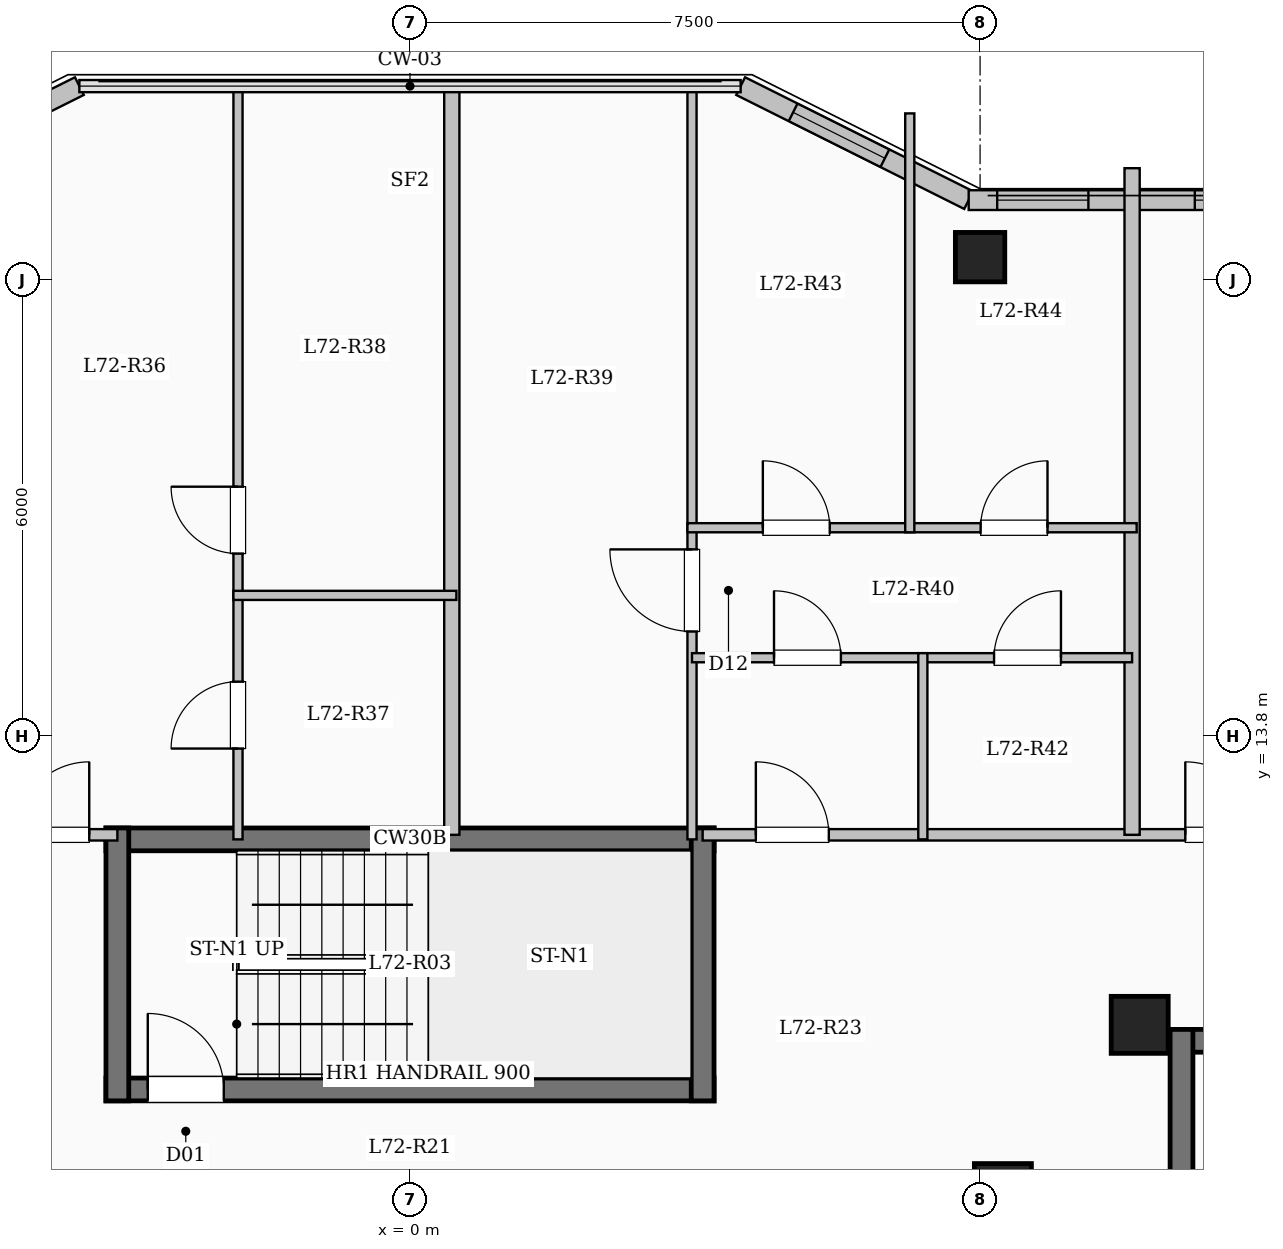
"""IFC4 building model, lengths in metres.
Left out: names, types, materials, properties, quantities, classifications, styles, units other than length and angle.
Written with IfcOpenShell. Run it as: python <this file> out.ifc"""

import sys

from ifc_helpers import new_model, si_unit, direction, frame, frame_2d, origin, origin_2d, place, context, subcontext, project, spatial, rectangle, extrude, element, fill, save


model = new_model("IFC4")
c1 = context("Model", 3, precision=1e-05, world=origin(), true_north=direction((0.0, 1.0)))
c2 = subcontext(c1, "Body", "Model", "MODEL_VIEW")
j1 = project(units=[si_unit("LENGTHUNIT", "METRE"), si_unit("PLANEANGLEUNIT", "RADIAN")], contexts=[c1])
p1 = place(None, origin())
s1 = spatial("IfcSite", under=j1, at=p1, CompositionType="ELEMENT")
p2 = place(p1, origin())
s2 = spatial("IfcBuilding", under=s1, at=p2, CompositionType="ELEMENT")
p3 = place(p2, frame((0.0, 0.0, 264.95)))
s3 = spatial("IfcBuildingStorey", under=s2, at=p3, CompositionType="ELEMENT", Elevation=264.95)
for number, where, z_axis, x_axis in (
    (1, (7.8, 7.8, 0.0), (0.0, 0.0, 1.0), (1.0, 0.0, 0.0)),
    (2, (9.6, 10.0, 0.0), (0.0, 0.0, 1.0), (1.0, 0.0, 0.0)),
):
    element("IfcColumn", number, at=place(p3, frame(where, z_axis=z_axis, x_axis=x_axis)), inside=s3, PredefinedType="COLUMN", context=c2, shape_type="SweptSolid", body=[
        extrude(rectangle(XDim=0.75, YDim=0.75, at=origin_2d()), origin(), (0.0, 0.0, 1.0), 3.35),
    ])
p4 = place(p3, frame((7.5, 20.1, 0.0), z_axis=(0.0, 0.0, 1.0), x_axis=(1.0, 0.0, 0.0)))
e3 = element("IfcColumn", 3, at=p4, inside=s3, PredefinedType="COLUMN", context=c2, shape_type="SweptSolid", body=[
    extrude(rectangle(XDim=0.65, YDim=0.65, at=origin_2d()), origin(), (0.0, 0.0, 1.0), 3.35),
])
p5 = place(p3, frame((-7.35, 20.85, 0.0), z_axis=(0.0, 0.0, 1.0), x_axis=(0.894427191, 0.4472135955, 0.0)))
e4 = element("IfcWall", 4, at=p5, inside=s3, PredefinedType="SOLIDWALL", context=c2, shape_type="SweptSolid", body=[
    extrude(rectangle(XDim=3.354, YDim=0.26, at=frame_2d((1.677, 0.0))), origin(), (0.0, 0.0, 1.0), 3.1),
])
p6 = place(p5, frame((0.401, 0.0, 0.95)))
e5 = element("IfcOpeningElement", 5, at=p6, cuts=e4, PredefinedType="OPENING", context=c2, shape_type="SweptSolid", body=[
    extrude(rectangle(XDim=1.0, YDim=1.5, at=frame_2d((0.5, 0.75))), frame((0.0, 0.14, 0.0), z_axis=(0.0, -1.0, 0.0), x_axis=(1.0, 0.0, 0.0)), (0.0, 0.0, 1.0), 0.28),
])
p7 = place(p3, frame((4.35, 22.35, 0.0), z_axis=(0.0, 0.0, 1.0), x_axis=(0.894427191, -0.4472135955, 0.0)))
e6 = element("IfcWall", 6, at=p7, inside=s3, PredefinedType="SOLIDWALL", context=c2, shape_type="SweptSolid", body=[
    extrude(rectangle(XDim=3.354, YDim=0.26, at=frame_2d((1.677, 0.0))), origin(), (0.0, 0.0, 1.0), 3.1),
])
p8 = place(p7, frame((0.772, 0.0, 0.95)))
e7 = element("IfcOpeningElement", 7, at=p8, cuts=e6, PredefinedType="OPENING", context=c2, shape_type="SweptSolid", body=[
    extrude(rectangle(XDim=1.35, YDim=1.55, at=frame_2d((0.675, 0.775))), frame((0.0, 0.14, 0.0), z_axis=(0.0, -1.0, 0.0), x_axis=(1.0, 0.0, 0.0)), (0.0, 0.0, 1.0), 0.28),
])
p9 = place(p3, frame((7.35, 20.85, 0.0), z_axis=(0.0, 0.0, 1.0), x_axis=(1.0, 0.0, 0.0)))
e8 = element("IfcWall", 8, at=p9, inside=s3, PredefinedType="SOLIDWALL", context=c2, shape_type="SweptSolid", body=[
    extrude(rectangle(XDim=10.5, YDim=0.26, at=frame_2d((5.25, 0.0))), origin(), (0.0, 0.0, 1.0), 3.1),
])
p10 = place(p9, frame((0.375, 0.0, 0.95)))
e9 = element("IfcOpeningElement", 9, at=p10, cuts=e8, PredefinedType="OPENING", context=c2, shape_type="SweptSolid", body=[
    extrude(rectangle(XDim=1.2, YDim=1.5, at=frame_2d((0.6, 0.75))), frame((0.0, 0.14, 0.0), z_axis=(0.0, -1.0, 0.0), x_axis=(1.0, 0.0, 0.0)), (0.0, 0.0, 1.0), 0.28),
])
p11 = place(p9, frame((2.975, 0.0, 0.9)))
e10 = element("IfcOpeningElement", 10, at=p11, cuts=e8, PredefinedType="OPENING", context=c2, shape_type="SweptSolid", body=[
    extrude(rectangle(XDim=1.65, YDim=1.6, at=frame_2d((0.825, 0.8))), frame((0.0, 0.14, 0.0), z_axis=(0.0, -1.0, 0.0), x_axis=(1.0, 0.0, 0.0)), (0.0, 0.0, 1.0), 0.28),
])
p12 = place(p9, frame((6.1, 0.0, 0.95)))
e11 = element("IfcOpeningElement", 11, at=p12, cuts=e8, PredefinedType="OPENING", context=c2, shape_type="SweptSolid", body=[
    extrude(rectangle(XDim=1.2, YDim=1.5, at=frame_2d((0.6, 0.75))), frame((0.0, 0.14, 0.0), z_axis=(0.0, -1.0, 0.0), x_axis=(1.0, 0.0, 0.0)), (0.0, 0.0, 1.0), 0.28),
])
p13 = place(p9, frame((8.575, 0.0, 0.95)))
e12 = element("IfcOpeningElement", 12, at=p13, cuts=e8, PredefinedType="OPENING", context=c2, shape_type="SweptSolid", body=[
    extrude(rectangle(XDim=1.2, YDim=1.5, at=frame_2d((0.6, 0.75))), frame((0.0, 0.14, 0.0), z_axis=(0.0, -1.0, 0.0), x_axis=(1.0, 0.0, 0.0)), (0.0, 0.0, 1.0), 0.28),
])
p14 = place(p3, frame((10.0, 9.79, 0.0), z_axis=(0.0, 0.0, 1.0), x_axis=(1.0, 0.0, 0.0)))
e13 = element("IfcWall", 13, at=p14, inside=s3, PredefinedType="SHEAR", context=c2, shape_type="SweptSolid", body=[
    extrude(rectangle(XDim=8.0, YDim=0.3, at=frame_2d((4.0, 0.0))), origin(), (0.0, 0.0, 1.0), 3.35),
])
p15 = place(p3, frame((10.15, 6.35, 0.0), z_axis=(0.0, 0.0, 1.0), x_axis=(0.0, 1.0, 0.0)))
e14 = element("IfcWall", 14, at=p15, inside=s3, PredefinedType="SHEAR", context=c2, shape_type="SweptSolid", body=[
    extrude(rectangle(XDim=3.59, YDim=0.3, at=frame_2d((1.795, 0.0))), origin(), (0.0, 0.0, 1.0), 3.35),
])
p16 = place(p3, frame((-4.0, 12.44, 0.0), z_axis=(0.0, 0.0, 1.0), x_axis=(1.0, 0.0, 0.0)))
e15 = element("IfcWall", 15, at=p16, inside=s3, PredefinedType="SHEAR", context=c2, shape_type="SweptSolid", body=[
    extrude(rectangle(XDim=8.0, YDim=0.3, at=frame_2d((4.0, 0.0))), origin(), (0.0, 0.0, 1.0), 3.35),
])
p17 = place(p3, frame((-4.0, 9.15, 0.0), z_axis=(0.0, 0.0, 1.0), x_axis=(1.0, 0.0, 0.0)))
e16 = element("IfcWall", 16, at=p17, inside=s3, PredefinedType="SHEAR", context=c2, shape_type="SweptSolid", body=[
    extrude(rectangle(XDim=8.0, YDim=0.3, at=frame_2d((4.0, 0.0))), origin(), (0.0, 0.0, 1.0), 3.35),
])
p18 = place(p17, frame((0.55, 0.0, 0.0)))
e17 = element("IfcOpeningElement", 17, at=p18, cuts=e16, PredefinedType="OPENING", context=c2, shape_type="SweptSolid", body=[
    extrude(rectangle(XDim=1.0, YDim=2.15, at=frame_2d((0.5, 1.075))), frame((0.0, 0.16, 0.0), z_axis=(0.0, -1.0, 0.0), x_axis=(1.0, 0.0, 0.0)), (0.0, 0.0, 1.0), 0.32),
])
for number, where, z_axis, x_axis in (
    (18, (-3.85, 9.0, 0.0), (0.0, 0.0, 1.0), (0.0, 1.0, 0.0)),
    (19, (3.85, 9.0, 0.0), (0.0, 0.0, 1.0), (0.0, 1.0, 0.0)),
):
    element("IfcWall", number, at=place(p3, frame(where, z_axis=z_axis, x_axis=x_axis)), inside=s3, PredefinedType="SHEAR", context=c2, shape_type="SweptSolid", body=[
        extrude(rectangle(XDim=3.59, YDim=0.3, at=frame_2d((1.795, 0.0))), origin(), (0.0, 0.0, 1.0), 3.35),
    ])
p19 = place(p3, frame((-17.75, 12.5, 0.0), z_axis=(0.0, 0.0, 1.0), x_axis=(1.0, 0.0, 0.0)))
e20 = element("IfcWall", 20, at=p19, inside=s3, PredefinedType="PARTITIONING", context=c2, shape_type="SweptSolid", body=[
    extrude(rectangle(XDim=13.9, YDim=0.15, at=frame_2d((6.95, 0.0))), origin(), (0.0, 0.0, 1.0), 3.1),
])
p20 = place(p19, frame((0.7, 0.0, 0.0)))
e21 = element("IfcOpeningElement", 21, at=p20, cuts=e20, PredefinedType="OPENING", context=c2, shape_type="SweptSolid", body=[
    extrude(rectangle(XDim=0.96, YDim=2.15, at=frame_2d((0.48, 1.075))), frame((0.0, 0.085, 0.0), z_axis=(0.0, -1.0, 0.0), x_axis=(1.0, 0.0, 0.0)), (0.0, 0.0, 1.0), 0.17),
])
p21 = place(p19, frame((7.105, 0.0, 0.0)))
e22 = element("IfcOpeningElement", 22, at=p21, cuts=e20, PredefinedType="OPENING", context=c2, shape_type="SweptSolid", body=[
    extrude(rectangle(XDim=0.96, YDim=2.15, at=frame_2d((0.48, 1.075))), frame((0.0, 0.085, 0.0), z_axis=(0.0, -1.0, 0.0), x_axis=(1.0, 0.0, 0.0)), (0.0, 0.0, 1.0), 0.17),
])
p22 = place(p19, frame((12.57, 0.0, 0.0)))
e23 = element("IfcOpeningElement", 23, at=p22, cuts=e20, PredefinedType="OPENING", context=c2, shape_type="SweptSolid", body=[
    extrude(rectangle(XDim=0.96, YDim=2.15, at=frame_2d((0.48, 1.075))), frame((0.0, 0.085, 0.0), z_axis=(0.0, -1.0, 0.0), x_axis=(1.0, 0.0, 0.0)), (0.0, 0.0, 1.0), 0.17),
])
p23 = place(p3, frame((3.85, 12.5, 0.0), z_axis=(0.0, 0.0, 1.0), x_axis=(1.0, 0.0, 0.0)))
e24 = element("IfcWall", 24, at=p23, inside=s3, PredefinedType="PARTITIONING", context=c2, shape_type="SweptSolid", body=[
    extrude(rectangle(XDim=13.9, YDim=0.15, at=frame_2d((6.95, 0.0))), origin(), (0.0, 0.0, 1.0), 3.1),
])
p24 = place(p23, frame((0.7, 0.0, 0.0)))
e25 = element("IfcOpeningElement", 25, at=p24, cuts=e24, PredefinedType="OPENING", context=c2, shape_type="SweptSolid", body=[
    extrude(rectangle(XDim=0.96, YDim=2.15, at=frame_2d((0.48, 1.075))), frame((0.0, 0.085, 0.0), z_axis=(0.0, -1.0, 0.0), x_axis=(1.0, 0.0, 0.0)), (0.0, 0.0, 1.0), 0.17),
])
p25 = place(p23, frame((6.35, 0.0, 0.0)))
e26 = element("IfcOpeningElement", 26, at=p25, cuts=e24, PredefinedType="OPENING", context=c2, shape_type="SweptSolid", body=[
    extrude(rectangle(XDim=0.96, YDim=2.15, at=frame_2d((0.48, 1.075))), frame((0.0, 0.085, 0.0), z_axis=(0.0, -1.0, 0.0), x_axis=(1.0, 0.0, 0.0)), (0.0, 0.0, 1.0), 0.17),
])
p26 = place(p3, frame((0.55, 12.5, 0.0), z_axis=(0.0, 0.0, 1.0), x_axis=(0.0, 1.0, 0.0)))
e27 = element("IfcWall", 27, at=p26, inside=s3, PredefinedType="SOLIDWALL", context=c2, shape_type="SweptSolid", body=[
    extrude(rectangle(XDim=9.88, YDim=0.2, at=frame_2d((4.94, 0.0))), origin(), (0.0, 0.0, 1.0), 3.1),
])
p27 = place(p3, frame((-2.263, 12.44, 0.0), z_axis=(0.0, 0.0, 1.0), x_axis=(0.0, 1.0, 0.0)))
e28 = element("IfcWall", 28, at=p27, inside=s3, PredefinedType="PARTITIONING", context=c2, shape_type="SweptSolid", body=[
    extrude(rectangle(XDim=3.21, YDim=0.12, at=frame_2d((1.605, 0.0))), origin(), (0.0, 0.0, 1.0), 3.1),
])
p28 = place(p27, frame((1.195, 0.0, 0.0)))
e29 = element("IfcOpeningElement", 29, at=p28, cuts=e28, PredefinedType="OPENING", context=c2, shape_type="SweptSolid", body=[
    extrude(rectangle(XDim=0.88, YDim=2.1, at=frame_2d((0.44, 1.05))), frame((0.0, 0.07, 0.0), z_axis=(0.0, -1.0, 0.0), x_axis=(1.0, 0.0, 0.0)), (0.0, 0.0, 1.0), 0.14),
])
p29 = place(p3, frame((-2.263, 15.65, 0.0), z_axis=(0.0, 0.0, 1.0), x_axis=(0.0, 1.0, 0.0)))
e30 = element("IfcWall", 30, at=p29, inside=s3, PredefinedType="PARTITIONING", context=c2, shape_type="SweptSolid", body=[
    extrude(rectangle(XDim=6.73, YDim=0.12, at=frame_2d((3.365, 0.0))), origin(), (0.0, 0.0, 1.0), 3.1),
])
p30 = place(p29, frame((0.55, 0.0, 0.0)))
e31 = element("IfcOpeningElement", 31, at=p30, cuts=e30, PredefinedType="OPENING", context=c2, shape_type="SweptSolid", body=[
    extrude(rectangle(XDim=0.88, YDim=2.1, at=frame_2d((0.44, 1.05))), frame((0.0, 0.07, 0.0), z_axis=(0.0, -1.0, 0.0), x_axis=(1.0, 0.0, 0.0)), (0.0, 0.0, 1.0), 0.14),
])
p31 = place(p3, frame((-2.323, 15.65, 0.0), z_axis=(0.0, 0.0, 1.0), x_axis=(1.0, 0.0, 0.0)))
e32 = element("IfcWall", 32, at=p31, inside=s3, PredefinedType="PARTITIONING", context=c2, shape_type="SweptSolid", body=[
    extrude(rectangle(XDim=2.933, YDim=0.12, at=frame_2d((1.467, 0.0))), origin(), (0.0, 0.0, 1.0), 2.785),
])
p32 = place(p3, frame((9.5, 12.5, 0.0), z_axis=(0.0, 0.0, 1.0), x_axis=(0.0, 1.0, 0.0)))
e33 = element("IfcWall", 33, at=p32, inside=s3, PredefinedType="SOLIDWALL", context=c2, shape_type="SweptSolid", body=[
    extrude(rectangle(XDim=8.77, YDim=0.2, at=frame_2d((4.385, 0.0))), origin(), (0.0, 0.0, 1.0), 3.1),
])
p33 = place(p3, frame((3.71, 12.44, 0.0), z_axis=(0.0, 0.0, 1.0), x_axis=(0.0, 1.0, 0.0)))
e34 = element("IfcWall", 34, at=p33, inside=s3, PredefinedType="PARTITIONING", context=c2, shape_type="SweptSolid", body=[
    extrude(rectangle(XDim=9.94, YDim=0.12, at=frame_2d((4.97, 0.0))), origin(), (0.0, 0.0, 1.0), 3.1),
])
p34 = place(p33, frame((2.735, 0.0, 0.0)))
e35 = element("IfcOpeningElement", 35, at=p34, cuts=e34, PredefinedType="OPENING", context=c2, shape_type="SweptSolid", body=[
    extrude(rectangle(XDim=1.08, YDim=2.15, at=frame_2d((0.54, 1.075))), frame((0.0, 0.07, 0.0), z_axis=(0.0, -1.0, 0.0), x_axis=(1.0, 0.0, 0.0)), (0.0, 0.0, 1.0), 0.14),
])
p35 = place(p3, frame((3.71, 14.83, 0.0), z_axis=(0.0, 0.0, 1.0), x_axis=(1.0, 0.0, 0.0)))
e36 = element("IfcWall", 36, at=p35, inside=s3, PredefinedType="PARTITIONING", context=c2, shape_type="SweptSolid", body=[
    extrude(rectangle(XDim=3.037, YDim=0.12, at=frame_2d((1.519, 0.0))), origin(), (0.0, 0.0, 1.0), 3.1),
])
p36 = place(p35, frame((1.079, 0.0, 0.0)))
e37 = element("IfcOpeningElement", 37, at=p36, cuts=e36, PredefinedType="OPENING", context=c2, shape_type="SweptSolid", body=[
    extrude(rectangle(XDim=0.88, YDim=2.1, at=frame_2d((0.44, 1.05))), frame((0.0, 0.07, 0.0), z_axis=(0.0, -1.0, 0.0), x_axis=(1.0, 0.0, 0.0)), (0.0, 0.0, 1.0), 0.14),
])
p37 = place(p3, frame((6.747, 14.83, 0.0), z_axis=(0.0, 0.0, 1.0), x_axis=(1.0, 0.0, 0.0)))
e38 = element("IfcWall", 38, at=p37, inside=s3, PredefinedType="PARTITIONING", context=c2, shape_type="SweptSolid", body=[
    extrude(rectangle(XDim=2.753, YDim=0.12, at=frame_2d((1.376, 0.0))), origin(), (0.0, 0.0, 1.0), 3.1),
])
p38 = place(p37, frame((0.937, 0.0, 0.0)))
e39 = element("IfcOpeningElement", 39, at=p38, cuts=e38, PredefinedType="OPENING", context=c2, shape_type="SweptSolid", body=[
    extrude(rectangle(XDim=0.88, YDim=2.1, at=frame_2d((0.44, 1.05))), frame((0.0, 0.07, 0.0), z_axis=(0.0, -1.0, 0.0), x_axis=(1.0, 0.0, 0.0)), (0.0, 0.0, 1.0), 0.14),
])
p39 = place(p3, frame((3.65, 16.54, 0.0), z_axis=(0.0, 0.0, 1.0), x_axis=(1.0, 0.0, 0.0)))
e40 = element("IfcWall", 40, at=p39, inside=s3, PredefinedType="PARTITIONING", context=c2, shape_type="SweptSolid", body=[
    extrude(rectangle(XDim=5.91, YDim=0.12, at=frame_2d((2.955, 0.0))), origin(), (0.0, 0.0, 1.0), 3.1),
])
p40 = place(p39, frame((0.992, 0.0, 0.0)))
e41 = element("IfcOpeningElement", 41, at=p40, cuts=e40, PredefinedType="OPENING", context=c2, shape_type="SweptSolid", body=[
    extrude(rectangle(XDim=0.88, YDim=2.1, at=frame_2d((0.44, 1.05))), frame((0.0, 0.07, 0.0), z_axis=(0.0, -1.0, 0.0), x_axis=(1.0, 0.0, 0.0)), (0.0, 0.0, 1.0), 0.14),
])
p41 = place(p39, frame((3.857, 0.0, 0.0)))
e42 = element("IfcOpeningElement", 42, at=p41, cuts=e40, PredefinedType="OPENING", context=c2, shape_type="SweptSolid", body=[
    extrude(rectangle(XDim=0.88, YDim=2.1, at=frame_2d((0.44, 1.05))), frame((0.0, 0.07, 0.0), z_axis=(0.0, -1.0, 0.0), x_axis=(1.0, 0.0, 0.0)), (0.0, 0.0, 1.0), 0.14),
])
p42 = place(p3, frame((6.747, 12.44, 0.0), z_axis=(0.0, 0.0, 1.0), x_axis=(0.0, 1.0, 0.0)))
e43 = element("IfcWall", 43, at=p42, inside=s3, PredefinedType="PARTITIONING", context=c2, shape_type="SweptSolid", body=[
    extrude(rectangle(XDim=2.45, YDim=0.12, at=frame_2d((1.225, 0.0))), origin(), (0.0, 0.0, 1.0), 3.1),
])
p43 = place(p3, frame((6.575, 16.48, 0.0), z_axis=(0.0, 0.0, 1.0), x_axis=(0.0, 1.0, 0.0)))
e44 = element("IfcWall", 44, at=p43, inside=s3, PredefinedType="PARTITIONING", context=c2, shape_type="SweptSolid", body=[
    extrude(rectangle(XDim=5.511, YDim=0.12, at=frame_2d((2.755, 0.0))), origin(), (0.0, 0.0, 1.0), 3.1),
])
p44 = place(p8, origin())
e45 = element("IfcWindow", 45, at=p44, inside=s3, PartitioningType="SINGLE_PANEL", PredefinedType="WINDOW", context=c2, shape_type="SweptSolid", body=[
    extrude(rectangle(XDim=1.35, YDim=1.55, at=frame_2d((0.675, 0.775))), frame((0.0, 0.03, 0.0), z_axis=(0.0, -1.0, 0.0), x_axis=(1.0, 0.0, 0.0)), (0.0, 0.0, 1.0), 0.06),
])
fill(e7, e45)
p45 = place(p10, origin())
e46 = element("IfcWindow", 46, at=p45, inside=s3, PartitioningType="SINGLE_PANEL", PredefinedType="WINDOW", context=c2, shape_type="SweptSolid", body=[
    extrude(rectangle(XDim=1.2, YDim=1.5, at=frame_2d((0.6, 0.75))), frame((0.0, 0.03, 0.0), z_axis=(0.0, -1.0, 0.0), x_axis=(1.0, 0.0, 0.0)), (0.0, 0.0, 1.0), 0.06),
])
fill(e9, e46)
p46 = place(p11, origin())
e47 = element("IfcWindow", 47, at=p46, inside=s3, PartitioningType="SINGLE_PANEL", PredefinedType="WINDOW", context=c2, shape_type="SweptSolid", body=[
    extrude(rectangle(XDim=1.65, YDim=1.6, at=frame_2d((0.825, 0.8))), frame((0.0, 0.03, 0.0), z_axis=(0.0, -1.0, 0.0), x_axis=(1.0, 0.0, 0.0)), (0.0, 0.0, 1.0), 0.06),
])
fill(e10, e47)
p47 = place(p18, origin())
e48 = element("IfcDoor", 48, at=p47, inside=s3, OperationType="SINGLE_SWING_LEFT", PredefinedType="DOOR", context=c2, shape_type="SweptSolid", body=[
    extrude(rectangle(XDim=1.0, YDim=2.15, at=frame_2d((0.5, 1.075))), frame((0.0, 0.025, 0.0), z_axis=(0.0, -1.0, 0.0), x_axis=(1.0, 0.0, 0.0)), (0.0, 0.0, 1.0), 0.05),
])
fill(e17, e48)
p48 = place(p22, origin())
e49 = element("IfcDoor", 49, at=p48, inside=s3, OperationType="SINGLE_SWING_RIGHT", PredefinedType="DOOR", context=c2, shape_type="SweptSolid", body=[
    extrude(rectangle(XDim=0.96, YDim=2.15, at=frame_2d((0.48, 1.075))), frame((0.0, 0.025, 0.0), z_axis=(0.0, -1.0, 0.0), x_axis=(1.0, 0.0, 0.0)), (0.0, 0.0, 1.0), 0.05),
])
fill(e23, e49)
p49 = place(p28, origin())
e50 = element("IfcDoor", 50, at=p49, inside=s3, OperationType="SINGLE_SWING_LEFT", PredefinedType="DOOR", context=c2, shape_type="SweptSolid", body=[
    extrude(rectangle(XDim=0.88, YDim=2.1, at=frame_2d((0.44, 1.05))), frame((0.0, 0.025, 0.0), z_axis=(0.0, -1.0, 0.0), x_axis=(1.0, 0.0, 0.0)), (0.0, 0.0, 1.0), 0.05),
])
fill(e29, e50)
p50 = place(p30, origin())
e51 = element("IfcDoor", 51, at=p50, inside=s3, OperationType="SINGLE_SWING_RIGHT", PredefinedType="DOOR", context=c2, shape_type="SweptSolid", body=[
    extrude(rectangle(XDim=0.88, YDim=2.1, at=frame_2d((0.44, 1.05))), frame((0.0, 0.025, 0.0), z_axis=(0.0, -1.0, 0.0), x_axis=(1.0, 0.0, 0.0)), (0.0, 0.0, 1.0), 0.05),
])
fill(e31, e51)
p51 = place(p24, origin())
e52 = element("IfcDoor", 52, at=p51, inside=s3, OperationType="SINGLE_SWING_LEFT", PredefinedType="DOOR", context=c2, shape_type="SweptSolid", body=[
    extrude(rectangle(XDim=0.96, YDim=2.15, at=frame_2d((0.48, 1.075))), frame((0.0, 0.025, 0.0), z_axis=(0.0, -1.0, 0.0), x_axis=(1.0, 0.0, 0.0)), (0.0, 0.0, 1.0), 0.05),
])
fill(e25, e52)
p52 = place(p34, origin())
e53 = element("IfcDoor", 53, at=p52, inside=s3, OperationType="SINGLE_SWING_RIGHT", PredefinedType="DOOR", context=c2, shape_type="SweptSolid", body=[
    extrude(rectangle(XDim=1.08, YDim=2.15, at=frame_2d((0.54, 1.075))), frame((0.0, 0.025, 0.0), z_axis=(0.0, -1.0, 0.0), x_axis=(1.0, 0.0, 0.0)), (0.0, 0.0, 1.0), 0.05),
])
fill(e35, e53)
p53 = place(p36, origin())
e54 = element("IfcDoor", 54, at=p53, inside=s3, OperationType="SINGLE_SWING_LEFT", PredefinedType="DOOR", context=c2, shape_type="SweptSolid", body=[
    extrude(rectangle(XDim=0.88, YDim=2.1, at=frame_2d((0.44, 1.05))), frame((0.0, 0.025, 0.0), z_axis=(0.0, -1.0, 0.0), x_axis=(1.0, 0.0, 0.0)), (0.0, 0.0, 1.0), 0.05),
])
fill(e37, e54)
p54 = place(p38, origin())
e55 = element("IfcDoor", 55, at=p54, inside=s3, OperationType="SINGLE_SWING_RIGHT", PredefinedType="DOOR", context=c2, shape_type="SweptSolid", body=[
    extrude(rectangle(XDim=0.88, YDim=2.1, at=frame_2d((0.44, 1.05))), frame((0.0, 0.025, 0.0), z_axis=(0.0, -1.0, 0.0), x_axis=(1.0, 0.0, 0.0)), (0.0, 0.0, 1.0), 0.05),
])
fill(e39, e55)
p55 = place(p40, origin())
e56 = element("IfcDoor", 56, at=p55, inside=s3, OperationType="SINGLE_SWING_LEFT", PredefinedType="DOOR", context=c2, shape_type="SweptSolid", body=[
    extrude(rectangle(XDim=0.88, YDim=2.1, at=frame_2d((0.44, 1.05))), frame((0.0, 0.025, 0.0), z_axis=(0.0, -1.0, 0.0), x_axis=(1.0, 0.0, 0.0)), (0.0, 0.0, 1.0), 0.05),
])
fill(e41, e56)
p56 = place(p41, origin())
e57 = element("IfcDoor", 57, at=p56, inside=s3, OperationType="SINGLE_SWING_RIGHT", PredefinedType="DOOR", context=c2, shape_type="SweptSolid", body=[
    extrude(rectangle(XDim=0.88, YDim=2.1, at=frame_2d((0.44, 1.05))), frame((0.0, 0.025, 0.0), z_axis=(0.0, -1.0, 0.0), x_axis=(1.0, 0.0, 0.0)), (0.0, 0.0, 1.0), 0.05),
])
fill(e42, e57)
p57 = place(p25, origin())
e58 = element("IfcDoor", 58, at=p57, inside=s3, OperationType="SINGLE_SWING_LEFT", PredefinedType="DOOR", context=c2, shape_type="SweptSolid", body=[
    extrude(rectangle(XDim=0.96, YDim=2.15, at=frame_2d((0.48, 1.075))), frame((0.0, 0.025, 0.0), z_axis=(0.0, -1.0, 0.0), x_axis=(1.0, 0.0, 0.0)), (0.0, 0.0, 1.0), 0.05),
])
fill(e26, e58)
save(model, sys.argv[1])
